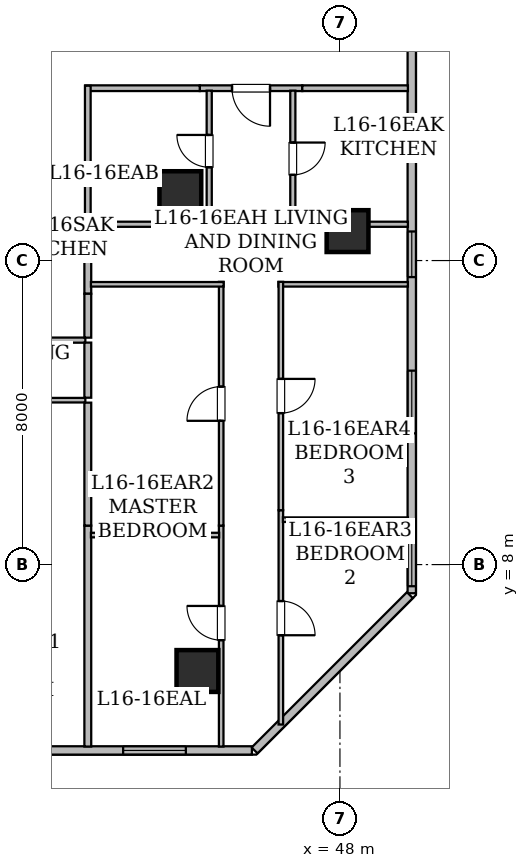
"""IFC4 building model, lengths in metres.
Left out: names, types, materials, properties, quantities, classifications, styles, units other than length and angle.
Written with IfcOpenShell. Run it as: python <this file> out.ifc"""

import sys

from ifc_helpers import new_model, si_unit, direction, frame, frame_2d, origin, origin_2d, place, context, subcontext, project, spatial, rectangle, hollow_rectangle, extrude, element, fill, save


model = new_model("IFC4")
c1 = context("Model", 3, precision=1e-05, world=origin(), true_north=direction((0.0, 1.0)))
c2 = subcontext(c1, "Body", "Model", "MODEL_VIEW")
j1 = project(units=[si_unit("LENGTHUNIT", "METRE"), si_unit("PLANEANGLEUNIT", "RADIAN")], contexts=[c1])
p1 = place(None, origin())
s1 = spatial("IfcSite", under=j1, at=p1, CompositionType="ELEMENT")
p2 = place(p1, origin())
s2 = spatial("IfcBuilding", under=s1, at=p2, CompositionType="ELEMENT")
p3 = place(p2, frame((0.0, 0.0, 66.15)))
s3 = spatial("IfcBuildingStorey", under=s2, at=p3, CompositionType="ELEMENT", Elevation=66.15)
for number, where, z_axis, x_axis in (
    (1, (44.25, 5.2, 0.0), (0.0, 0.0, 1.0), (1.0, 0.0, 0.0)),
    (2, (48.2, 16.775, 0.0), (0.0, 0.0, 1.0), (1.0, 0.0, 0.0)),
    (3, (43.8, 17.8, 0.0), (0.0, 0.0, 1.0), (1.0, 0.0, 0.0)),
):
    element("IfcColumn", number, at=place(p3, frame(where, z_axis=z_axis, x_axis=x_axis)), inside=s3, PredefinedType="COLUMN", context=c2, shape_type="SweptSolid", body=[
        extrude(hollow_rectangle(XDim=1.1, YDim=1.1, WallThickness=0.055, at=origin_2d()), origin(), (0.0, 0.0, 1.0), 3.65),
    ])
p4 = place(p3, frame((49.89, 24.707, 0.0), z_axis=(0.0, 0.0, 1.0), x_axis=(0.0, -1.0, 0.0)))
e4 = element("IfcWall", 4, at=p4, inside=s3, PredefinedType="STANDARD", context=c2, shape_type="SweptSolid", body=[
    extrude(rectangle(XDim=17.461, YDim=0.22, at=frame_2d((8.73, 0.0))), origin(), (0.0, 0.0, 1.0), 3.43),
])
p5 = place(p4, frame((7.942, 0.0, 0.8)))
e5 = element("IfcOpeningElement", 5, at=p5, cuts=e4, PredefinedType="OPENING", context=c2, shape_type="SweptSolid", body=[
    extrude(rectangle(XDim=1.2, YDim=1.5, at=frame_2d((0.6, 0.75))), frame((0.0, 0.12, 0.0), z_axis=(0.0, -1.0, 0.0), x_axis=(1.0, 0.0, 0.0)), (0.0, 0.0, 1.0), 0.24),
])
p6 = place(p4, frame((15.926, 0.0, 0.85)))
e6 = element("IfcOpeningElement", 6, at=p6, cuts=e4, PredefinedType="OPENING", context=c2, shape_type="SweptSolid", body=[
    extrude(rectangle(XDim=1.35, YDim=1.5, at=frame_2d((0.675, 0.75))), frame((0.0, 0.12, 0.0), z_axis=(0.0, -1.0, 0.0), x_axis=(1.0, 0.0, 0.0)), (0.0, 0.0, 1.0), 0.24),
])
p7 = place(p4, frame((11.604, 0.0, 0.85)))
e7 = element("IfcOpeningElement", 7, at=p7, cuts=e4, PredefinedType="OPENING", context=c2, shape_type="SweptSolid", body=[
    extrude(rectangle(XDim=1.65, YDim=1.55, at=frame_2d((0.825, 0.775))), frame((0.0, 0.12, 0.0), z_axis=(0.0, -1.0, 0.0), x_axis=(1.0, 0.0, 0.0)), (0.0, 0.0, 1.0), 0.24),
])
p8 = place(p4, frame((0.163, 0.0, 0.85)))
e8 = element("IfcOpeningElement", 8, at=p8, cuts=e4, PredefinedType="OPENING", context=c2, shape_type="SweptSolid", body=[
    extrude(rectangle(XDim=1.35, YDim=1.5, at=frame_2d((0.675, 0.75))), frame((0.0, 0.12, 0.0), z_axis=(0.0, -1.0, 0.0), x_axis=(1.0, 0.0, 0.0)), (0.0, 0.0, 1.0), 0.24),
])
p9 = place(p3, frame((49.84, 7.196, 0.0), z_axis=(0.0, 0.0, 1.0), x_axis=(-0.707127905562, -0.70708565618, 0.0)))
e9 = element("IfcWall", 9, at=p9, inside=s3, PredefinedType="STANDARD", context=c2, shape_type="SweptSolid", body=[
    extrude(rectangle(XDim=5.779, YDim=0.22, at=frame_2d((2.889, 0.0))), origin(), (0.0, 0.0, 1.0), 3.43),
])
p10 = place(p3, frame((45.683, 3.11, 0.0), z_axis=(0.0, 0.0, 1.0), x_axis=(-1.0, 0.0, 0.0)))
e10 = element("IfcWall", 10, at=p10, inside=s3, PredefinedType="STANDARD", context=c2, shape_type="SweptSolid", body=[
    extrude(rectangle(XDim=37.368, YDim=0.22, at=frame_2d((18.684, 0.0))), origin(), (0.0, 0.0, 1.0), 3.43),
])
p11 = place(p10, frame((13.808, 0.0, 0.85)))
e11 = element("IfcOpeningElement", 11, at=p11, cuts=e10, PredefinedType="OPENING", context=c2, shape_type="SweptSolid", body=[
    extrude(rectangle(XDim=1.65, YDim=1.55, at=frame_2d((0.825, 0.775))), frame((0.0, 0.12, 0.0), z_axis=(0.0, -1.0, 0.0), x_axis=(1.0, 0.0, 0.0)), (0.0, 0.0, 1.0), 0.24),
])
p12 = place(p10, frame((32.554, 0.0, 0.85)))
e12 = element("IfcOpeningElement", 12, at=p12, cuts=e10, PredefinedType="OPENING", context=c2, shape_type="SweptSolid", body=[
    extrude(rectangle(XDim=1.65, YDim=1.55, at=frame_2d((0.825, 0.775))), frame((0.0, 0.12, 0.0), z_axis=(0.0, -1.0, 0.0), x_axis=(1.0, 0.0, 0.0)), (0.0, 0.0, 1.0), 0.24),
])
p13 = place(p10, frame((19.438, 0.0, 0.85)))
e13 = element("IfcOpeningElement", 13, at=p13, cuts=e10, PredefinedType="OPENING", context=c2, shape_type="SweptSolid", body=[
    extrude(rectangle(XDim=1.65, YDim=1.55, at=frame_2d((0.825, 0.775))), frame((0.0, 0.12, 0.0), z_axis=(0.0, -1.0, 0.0), x_axis=(1.0, 0.0, 0.0)), (0.0, 0.0, 1.0), 0.24),
])
p14 = place(p10, frame((21.869, 0.0, 0.8)))
e14 = element("IfcOpeningElement", 14, at=p14, cuts=e10, PredefinedType="OPENING", context=c2, shape_type="SweptSolid", body=[
    extrude(rectangle(XDim=1.2, YDim=1.5, at=frame_2d((0.6, 0.75))), frame((0.0, 0.12, 0.0), z_axis=(0.0, -1.0, 0.0), x_axis=(1.0, 0.0, 0.0)), (0.0, 0.0, 1.0), 0.24),
])
p15 = place(p10, frame((28.512, 0.0, 0.85)))
e15 = element("IfcOpeningElement", 15, at=p15, cuts=e10, PredefinedType="OPENING", context=c2, shape_type="SweptSolid", body=[
    extrude(rectangle(XDim=1.65, YDim=1.55, at=frame_2d((0.825, 0.775))), frame((0.0, 0.12, 0.0), z_axis=(0.0, -1.0, 0.0), x_axis=(1.0, 0.0, 0.0)), (0.0, 0.0, 1.0), 0.24),
])
p16 = place(p10, frame((24.567, 0.0, 0.85)))
e16 = element("IfcOpeningElement", 16, at=p16, cuts=e10, PredefinedType="OPENING", context=c2, shape_type="SweptSolid", body=[
    extrude(rectangle(XDim=1.65, YDim=1.55, at=frame_2d((0.825, 0.775))), frame((0.0, 0.12, 0.0), z_axis=(0.0, -1.0, 0.0), x_axis=(1.0, 0.0, 0.0)), (0.0, 0.0, 1.0), 0.24),
])
p17 = place(p10, frame((9.028, 0.0, 0.8)))
e17 = element("IfcOpeningElement", 17, at=p17, cuts=e10, PredefinedType="OPENING", context=c2, shape_type="SweptSolid", body=[
    extrude(rectangle(XDim=1.2, YDim=1.5, at=frame_2d((0.6, 0.75))), frame((0.0, 0.12, 0.0), z_axis=(0.0, -1.0, 0.0), x_axis=(1.0, 0.0, 0.0)), (0.0, 0.0, 1.0), 0.24),
])
p18 = place(p10, frame((5.753, 0.0, 0.85)))
e18 = element("IfcOpeningElement", 18, at=p18, cuts=e10, PredefinedType="OPENING", context=c2, shape_type="SweptSolid", body=[
    extrude(rectangle(XDim=1.65, YDim=1.55, at=frame_2d((0.825, 0.775))), frame((0.0, 0.12, 0.0), z_axis=(0.0, -1.0, 0.0), x_axis=(1.0, 0.0, 0.0)), (0.0, 0.0, 1.0), 0.24),
])
p19 = place(p10, frame((1.738, 0.0, 0.85)))
e19 = element("IfcOpeningElement", 19, at=p19, cuts=e10, PredefinedType="OPENING", context=c2, shape_type="SweptSolid", body=[
    extrude(rectangle(XDim=1.65, YDim=1.55, at=frame_2d((0.825, 0.775))), frame((0.0, 0.12, 0.0), z_axis=(0.0, -1.0, 0.0), x_axis=(1.0, 0.0, 0.0)), (0.0, 0.0, 1.0), 0.24),
])
p20 = place(p3, frame((41.3, 16.835, 0.0), z_axis=(0.0, 0.0, 1.0), x_axis=(-1.0, 0.0, 0.0)))
e20 = element("IfcWall", 20, at=p20, inside=s3, PredefinedType="STANDARD", context=c2, shape_type="SweptSolid", body=[
    extrude(rectangle(XDim=1.636, YDim=0.15, at=frame_2d((0.818, 0.0))), origin(), (0.0, 0.0, 1.0), 3.43),
])
p21 = place(p3, frame((47.009, 20.535, 0.0), z_axis=(0.0, 0.0, 1.0), x_axis=(-1.0, 0.0, 0.0)))
e21 = element("IfcWall", 21, at=p21, inside=s3, PredefinedType="STANDARD", context=c2, shape_type="SweptSolid", body=[
    extrude(rectangle(XDim=2.698, YDim=0.15, at=frame_2d((1.349, 0.0))), origin(), (0.0, 0.0, 1.0), 3.43),
])
p22 = place(p21, frame((0.849, 0.0, 0.0)))
e22 = element("IfcOpeningElement", 22, at=p22, cuts=e21, PredefinedType="OPENING", context=c2, shape_type="SweptSolid", body=[
    extrude(rectangle(XDim=1.0, YDim=2.15, at=frame_2d((0.5, 1.075))), frame((0.0, 0.085, 0.0), z_axis=(0.0, -1.0, 0.0), x_axis=(1.0, 0.0, 0.0)), (0.0, 0.0, 1.0), 0.17),
])
p23 = place(p3, frame((41.365, 17.204, 0.0), z_axis=(0.0, 0.0, 1.0), x_axis=(0.0, -1.0, 0.0)))
e23 = element("IfcWall", 23, at=p23, inside=s3, PredefinedType="STANDARD", context=c2, shape_type="SweptSolid", body=[
    extrude(rectangle(XDim=0.304, YDim=0.15, at=frame_2d((0.152, 0.0))), origin(), (0.0, 0.0, 1.0), 3.43),
])
p24 = place(p3, frame((44.311, 20.535, 0.0), z_axis=(0.0, 0.0, 1.0), x_axis=(-1.0, 0.0, 0.0)))
e24 = element("IfcWall", 24, at=p24, inside=s3, PredefinedType="STANDARD", context=c2, shape_type="SweptSolid", body=[
    extrude(rectangle(XDim=3.011, YDim=0.15, at=frame_2d((1.505, 0.0))), origin(), (0.0, 0.0, 1.0), 2.647),
])
p25 = place(p3, frame((41.365, 20.6, 0.0), z_axis=(0.0, 0.0, 1.0), x_axis=(0.0, -1.0, 0.0)))
e25 = element("IfcWall", 25, at=p25, inside=s3, PredefinedType="STANDARD", context=c2, shape_type="SweptSolid", body=[
    extrude(rectangle(XDim=3.396, YDim=0.15, at=frame_2d((1.698, 0.0))), origin(), (0.0, 0.0, 1.0), 2.647),
])
p26 = place(p3, frame((49.788, 20.535, 0.0), z_axis=(0.0, 0.0, 1.0), x_axis=(-1.0, 0.0, 0.0)))
e26 = element("IfcWall", 26, at=p26, inside=s3, PredefinedType="STANDARD", context=c2, shape_type="SweptSolid", body=[
    extrude(rectangle(XDim=2.779, YDim=0.15, at=frame_2d((1.39, 0.0))), origin(), (0.0, 0.0, 1.0), 2.803),
])
p27 = place(p3, frame((39.35, 13.906, 0.0), z_axis=(0.0, 0.0, 1.0), x_axis=(1.0, 0.0, 0.0)))
e27 = element("IfcWall", 27, at=p27, inside=s3, PredefinedType="PARTITIONING", context=c2, shape_type="SweptSolid", body=[
    extrude(rectangle(XDim=1.95, YDim=0.135, at=frame_2d((0.975, 0.0))), origin(), (0.0, 0.0, 1.0), 3.43),
])
p28 = place(p3, frame((41.3, 12.326, 0.0), z_axis=(0.0, 0.0, 1.0), x_axis=(-1.0, 0.0, 0.0)))
e28 = element("IfcWall", 28, at=p28, inside=s3, PredefinedType="PARTITIONING", context=c2, shape_type="SweptSolid", body=[
    extrude(rectangle(XDim=4.52, YDim=0.12, at=frame_2d((2.26, 0.0))), origin(), (0.0, 0.0, 1.0), 3.43),
])
p29 = place(p3, frame((41.365, 13.841, 0.0), z_axis=(0.0, 0.0, 1.0), x_axis=(0.0, -1.0, 0.0)))
e29 = element("IfcWall", 29, at=p29, inside=s3, PredefinedType="STANDARD", context=c2, shape_type="SweptSolid", body=[
    extrude(rectangle(XDim=1.45, YDim=0.18, at=frame_2d((0.725, 0.0))), origin(), (0.0, 0.0, 1.0), 3.43),
])
p30 = place(p3, frame((41.365, 16.77, 0.0), z_axis=(0.0, 0.0, 1.0), x_axis=(0.0, -1.0, 0.0)))
e30 = element("IfcWall", 30, at=p30, inside=s3, PredefinedType="STANDARD", context=c2, shape_type="SweptSolid", body=[
    extrude(rectangle(XDim=1.644, YDim=0.18, at=frame_2d((0.822, 0.0))), origin(), (0.0, 0.0, 1.0), 3.43),
])
p31 = place(p3, frame((41.365, 15.126, 0.0), z_axis=(0.0, 0.0, 1.0), x_axis=(0.0, -1.0, 0.0)))
e31 = element("IfcWall", 31, at=p31, inside=s3, PredefinedType="STANDARD", context=c2, shape_type="SweptSolid", body=[
    extrude(rectangle(XDim=1.155, YDim=0.18, at=frame_2d((0.578, 0.0))), origin(), (0.0, 0.0, 1.0), 3.43),
])
p32 = place(p3, frame((41.365, 9.026, 0.0), z_axis=(0.0, 0.0, 1.0), x_axis=(0.0, -1.0, 0.0)))
e32 = element("IfcWall", 32, at=p32, inside=s3, PredefinedType="STANDARD", context=c2, shape_type="SweptSolid", body=[
    extrude(rectangle(XDim=5.814, YDim=0.18, at=frame_2d((2.907, 0.0))), origin(), (0.0, 0.0, 1.0), 2.803),
])
p33 = place(p3, frame((41.365, 12.261, 0.0), z_axis=(0.0, 0.0, 1.0), x_axis=(0.0, -1.0, 0.0)))
e33 = element("IfcWall", 33, at=p33, inside=s3, PredefinedType="STANDARD", context=c2, shape_type="SweptSolid", body=[
    extrude(rectangle(XDim=3.235, YDim=0.18, at=frame_2d((1.618, 0.0))), origin(), (0.0, 0.0, 1.0), 3.43),
])
p34 = place(p3, frame((41.432, 16.955, 0.0), z_axis=(0.0, 0.0, 1.0), x_axis=(1.0, 0.0, 0.0)))
e34 = element("IfcWall", 34, at=p34, inside=s3, PredefinedType="PARTITIONING", context=c2, shape_type="SweptSolid", body=[
    extrude(rectangle(XDim=3.193, YDim=0.135, at=frame_2d((1.597, 0.0))), origin(), (0.0, 0.0, 1.0), 2.647),
])
p35 = place(p3, frame((44.56, 16.89, 0.0), z_axis=(0.0, 0.0, 1.0), x_axis=(0.0, 1.0, 0.0)))
e35 = element("IfcWall", 35, at=p35, inside=s3, PredefinedType="PARTITIONING", context=c2, shape_type="SweptSolid", body=[
    extrude(rectangle(XDim=3.58, YDim=0.135, at=frame_2d((1.79, 0.0))), origin(), (0.0, 0.0, 1.0), 2.647),
])
p36 = place(p35, frame((1.565, 0.0, 0.0)))
e36 = element("IfcOpeningElement", 36, at=p36, cuts=e35, PredefinedType="OPENING", context=c2, shape_type="SweptSolid", body=[
    extrude(rectangle(XDim=0.85, YDim=2.1, at=frame_2d((0.425, 1.05))), frame((0.0, 0.077, 0.0), z_axis=(0.0, -1.0, 0.0), x_axis=(1.0, 0.0, 0.0)), (0.0, 0.0, 1.0), 0.155),
])
p37 = place(p3, frame((46.76, 20.47, 0.0), z_axis=(0.0, 0.0, 1.0), x_axis=(0.0, -1.0, 0.0)))
e37 = element("IfcWall", 37, at=p37, inside=s3, PredefinedType="PARTITIONING", context=c2, shape_type="SweptSolid", body=[
    extrude(rectangle(XDim=3.58, YDim=0.135, at=frame_2d((1.79, 0.0))), origin(), (0.0, 0.0, 1.0), 2.647),
])
p38 = place(p37, frame((1.365, 0.0, 0.0)))
e38 = element("IfcOpeningElement", 38, at=p38, cuts=e37, PredefinedType="OPENING", context=c2, shape_type="SweptSolid", body=[
    extrude(rectangle(XDim=0.85, YDim=2.1, at=frame_2d((0.425, 1.05))), frame((0.0, 0.077, 0.0), z_axis=(0.0, -1.0, 0.0), x_axis=(1.0, 0.0, 0.0)), (0.0, 0.0, 1.0), 0.155),
])
p39 = place(p3, frame((46.695, 16.955, 0.0), z_axis=(0.0, 0.0, 1.0), x_axis=(1.0, 0.0, 0.0)))
e39 = element("IfcWall", 39, at=p39, inside=s3, PredefinedType="PARTITIONING", context=c2, shape_type="SweptSolid", body=[
    extrude(rectangle(XDim=3.093, YDim=0.135, at=frame_2d((1.546, 0.0))), origin(), (0.0, 0.0, 1.0), 2.647),
])
p40 = place(p3, frame((44.875, 3.212, 0.0), z_axis=(0.0, 0.0, 1.0), x_axis=(0.0, 1.0, 0.0)))
e40 = element("IfcWall", 40, at=p40, inside=s3, PredefinedType="PARTITIONING", context=c2, shape_type="SweptSolid", body=[
    extrude(rectangle(XDim=5.814, YDim=0.12, at=frame_2d((2.907, 0.0))), origin(), (0.0, 0.0, 1.0), 2.803),
])
p41 = place(p40, frame((2.8, 0.0, 0.0)))
e41 = element("IfcOpeningElement", 41, at=p41, cuts=e40, PredefinedType="OPENING", context=c2, shape_type="SweptSolid", body=[
    extrude(rectangle(XDim=0.9, YDim=2.1, at=frame_2d((0.45, 1.05))), frame((0.0, 0.07, 0.0), z_axis=(0.0, -1.0, 0.0), x_axis=(1.0, 0.0, 0.0)), (0.0, 0.0, 1.0), 0.14),
])
p42 = place(p3, frame((44.875, 9.026, 0.0), z_axis=(0.0, 0.0, 1.0), x_axis=(0.0, 1.0, 0.0)))
e42 = element("IfcWall", 42, at=p42, inside=s3, PredefinedType="PARTITIONING", context=c2, shape_type="SweptSolid", body=[
    extrude(rectangle(XDim=6.414, YDim=0.12, at=frame_2d((3.207, 0.0))), origin(), (0.0, 0.0, 1.0), 3.43),
])
p43 = place(p42, frame((2.757, 0.0, 0.0)))
e43 = element("IfcOpeningElement", 43, at=p43, cuts=e42, PredefinedType="OPENING", context=c2, shape_type="SweptSolid", body=[
    extrude(rectangle(XDim=0.9, YDim=2.1, at=frame_2d((0.45, 1.05))), frame((0.0, 0.07, 0.0), z_axis=(0.0, -1.0, 0.0), x_axis=(1.0, 0.0, 0.0)), (0.0, 0.0, 1.0), 0.14),
])
p44 = place(p3, frame((44.94, 15.375, 0.0), z_axis=(0.0, 0.0, 1.0), x_axis=(-1.0, 0.0, 0.0)))
e44 = element("IfcWall", 44, at=p44, inside=s3, PredefinedType="PARTITIONING", context=c2, shape_type="SweptSolid", body=[
    extrude(rectangle(XDim=3.493, YDim=0.12, at=frame_2d((1.747, 0.0))), origin(), (0.0, 0.0, 1.0), 2.647),
])
p45 = place(p3, frame((46.445, 9.431, 0.0), z_axis=(0.0, 0.0, 1.0), x_axis=(0.0, -1.0, 0.0)))
e45 = element("IfcWall", 45, at=p45, inside=s3, PredefinedType="PARTITIONING", context=c2, shape_type="SweptSolid", body=[
    extrude(rectangle(XDim=5.639, YDim=0.12, at=frame_2d((2.819, 0.0))), origin(), (0.0, 0.0, 1.0), 3.43),
])
p46 = place(p45, frame((2.39, 0.0, 0.0)))
e46 = element("IfcOpeningElement", 46, at=p46, cuts=e45, PredefinedType="OPENING", context=c2, shape_type="SweptSolid", body=[
    extrude(rectangle(XDim=0.9, YDim=2.1, at=frame_2d((0.45, 1.05))), frame((0.0, 0.07, 0.0), z_axis=(0.0, -1.0, 0.0), x_axis=(1.0, 0.0, 0.0)), (0.0, 0.0, 1.0), 0.14),
])
p47 = place(p3, frame((49.788, 15.375, 0.0), z_axis=(0.0, 0.0, 1.0), x_axis=(-1.0, 0.0, 0.0)))
e47 = element("IfcWall", 47, at=p47, inside=s3, PredefinedType="PARTITIONING", context=c2, shape_type="SweptSolid", body=[
    extrude(rectangle(XDim=3.408, YDim=0.12, at=frame_2d((1.704, 0.0))), origin(), (0.0, 0.0, 1.0), 2.803),
])
p48 = place(p3, frame((46.445, 15.44, 0.0), z_axis=(0.0, 0.0, 1.0), x_axis=(0.0, -1.0, 0.0)))
e48 = element("IfcWall", 48, at=p48, inside=s3, PredefinedType="PARTITIONING", context=c2, shape_type="SweptSolid", body=[
    extrude(rectangle(XDim=6.009, YDim=0.12, at=frame_2d((3.004, 0.0))), origin(), (0.0, 0.0, 1.0), 2.803),
])
p49 = place(p48, frame((2.554, 0.0, 0.0)))
e49 = element("IfcOpeningElement", 49, at=p49, cuts=e48, PredefinedType="OPENING", context=c2, shape_type="SweptSolid", body=[
    extrude(rectangle(XDim=0.9, YDim=2.1, at=frame_2d((0.45, 1.05))), frame((0.0, 0.07, 0.0), z_axis=(0.0, -1.0, 0.0), x_axis=(1.0, 0.0, 0.0)), (0.0, 0.0, 1.0), 0.14),
])
p50 = place(p3, frame((41.447, 8.777, 0.0), z_axis=(0.0, 0.0, 1.0), x_axis=(1.0, 0.0, 0.0)))
e50 = element("IfcWall", 50, at=p50, inside=s3, PredefinedType="PARTITIONING", context=c2, shape_type="SweptSolid", body=[
    extrude(rectangle(XDim=3.374, YDim=0.12, at=frame_2d((1.687, 0.0))), origin(), (0.0, 0.0, 1.0), 2.647),
])
p51 = place(p3, frame((46.499, 9.182, 0.0), z_axis=(0.0, 0.0, 1.0), x_axis=(1.0, 0.0, 0.0)))
e51 = element("IfcWall", 51, at=p51, inside=s3, PredefinedType="PARTITIONING", context=c2, shape_type="SweptSolid", body=[
    extrude(rectangle(XDim=3.289, YDim=0.12, at=frame_2d((1.645, 0.0))), origin(), (0.0, 0.0, 1.0), 3.43),
])
p52 = place(p5, origin())
e52 = element("IfcWindow", 52, at=p52, inside=s3, PartitioningType="SINGLE_PANEL", PredefinedType="WINDOW", context=c2, shape_type="SweptSolid", body=[
    extrude(rectangle(XDim=1.2, YDim=1.5, at=frame_2d((0.6, 0.75))), frame((0.0, 0.03, 0.0), z_axis=(0.0, -1.0, 0.0), x_axis=(1.0, 0.0, 0.0)), (0.0, 0.0, 1.0), 0.06),
])
fill(e5, e52)
p53 = place(p19, origin())
e53 = element("IfcWindow", 53, at=p53, inside=s3, PartitioningType="SINGLE_PANEL", PredefinedType="WINDOW", context=c2, shape_type="SweptSolid", body=[
    extrude(rectangle(XDim=1.65, YDim=1.55, at=frame_2d((0.825, 0.775))), frame((0.0, 0.03, 0.0), z_axis=(0.0, -1.0, 0.0), x_axis=(1.0, 0.0, 0.0)), (0.0, 0.0, 1.0), 0.06),
])
fill(e19, e53)
p54 = place(p6, origin())
e54 = element("IfcWindow", 54, at=p54, inside=s3, PartitioningType="SINGLE_PANEL", PredefinedType="WINDOW", context=c2, shape_type="SweptSolid", body=[
    extrude(rectangle(XDim=1.35, YDim=1.5, at=frame_2d((0.675, 0.75))), frame((0.0, 0.03, 0.0), z_axis=(0.0, -1.0, 0.0), x_axis=(1.0, 0.0, 0.0)), (0.0, 0.0, 1.0), 0.06),
])
fill(e6, e54)
p55 = place(p7, origin())
e55 = element("IfcWindow", 55, at=p55, inside=s3, PartitioningType="SINGLE_PANEL", PredefinedType="WINDOW", context=c2, shape_type="SweptSolid", body=[
    extrude(rectangle(XDim=1.65, YDim=1.55, at=frame_2d((0.825, 0.775))), frame((0.0, 0.03, 0.0), z_axis=(0.0, -1.0, 0.0), x_axis=(1.0, 0.0, 0.0)), (0.0, 0.0, 1.0), 0.06),
])
fill(e7, e55)
p56 = place(p22, origin())
e56 = element("IfcDoor", 56, at=p56, inside=s3, OperationType="SINGLE_SWING_LEFT", PredefinedType="DOOR", context=c2, shape_type="SweptSolid", body=[
    extrude(rectangle(XDim=1.0, YDim=2.15, at=frame_2d((0.5, 1.075))), frame((0.0, 0.025, 0.0), z_axis=(0.0, -1.0, 0.0), x_axis=(1.0, 0.0, 0.0)), (0.0, 0.0, 1.0), 0.05),
])
fill(e22, e56)
p57 = place(p36, origin())
e57 = element("IfcDoor", 57, at=p57, inside=s3, OperationType="SINGLE_SWING_RIGHT", PredefinedType="DOOR", context=c2, shape_type="SweptSolid", body=[
    extrude(rectangle(XDim=0.85, YDim=2.1, at=frame_2d((0.425, 1.05))), frame((0.0, 0.025, 0.0), z_axis=(0.0, -1.0, 0.0), x_axis=(1.0, 0.0, 0.0)), (0.0, 0.0, 1.0), 0.05),
])
fill(e36, e57)
p58 = place(p38, origin())
e58 = element("IfcDoor", 58, at=p58, inside=s3, OperationType="SINGLE_SWING_LEFT", PredefinedType="DOOR", context=c2, shape_type="SweptSolid", body=[
    extrude(rectangle(XDim=0.85, YDim=2.1, at=frame_2d((0.425, 1.05))), frame((0.0, 0.025, 0.0), z_axis=(0.0, -1.0, 0.0), x_axis=(1.0, 0.0, 0.0)), (0.0, 0.0, 1.0), 0.05),
])
fill(e38, e58)
p59 = place(p41, origin())
e59 = element("IfcDoor", 59, at=p59, inside=s3, OperationType="SINGLE_SWING_RIGHT", PredefinedType="DOOR", context=c2, shape_type="SweptSolid", body=[
    extrude(rectangle(XDim=0.9, YDim=2.1, at=frame_2d((0.45, 1.05))), frame((0.0, 0.025, 0.0), z_axis=(0.0, -1.0, 0.0), x_axis=(1.0, 0.0, 0.0)), (0.0, 0.0, 1.0), 0.05),
])
fill(e41, e59)
p60 = place(p43, origin())
e60 = element("IfcDoor", 60, at=p60, inside=s3, OperationType="SINGLE_SWING_LEFT", PredefinedType="DOOR", context=c2, shape_type="SweptSolid", body=[
    extrude(rectangle(XDim=0.9, YDim=2.1, at=frame_2d((0.45, 1.05))), frame((0.0, 0.025, 0.0), z_axis=(0.0, -1.0, 0.0), x_axis=(1.0, 0.0, 0.0)), (0.0, 0.0, 1.0), 0.05),
])
fill(e43, e60)
p61 = place(p46, origin())
e61 = element("IfcDoor", 61, at=p61, inside=s3, OperationType="SINGLE_SWING_RIGHT", PredefinedType="DOOR", context=c2, shape_type="SweptSolid", body=[
    extrude(rectangle(XDim=0.9, YDim=2.1, at=frame_2d((0.45, 1.05))), frame((0.0, 0.025, 0.0), z_axis=(0.0, -1.0, 0.0), x_axis=(1.0, 0.0, 0.0)), (0.0, 0.0, 1.0), 0.05),
])
fill(e46, e61)
p62 = place(p49, origin())
e62 = element("IfcDoor", 62, at=p62, inside=s3, OperationType="SINGLE_SWING_LEFT", PredefinedType="DOOR", context=c2, shape_type="SweptSolid", body=[
    extrude(rectangle(XDim=0.9, YDim=2.1, at=frame_2d((0.45, 1.05))), frame((0.0, 0.025, 0.0), z_axis=(0.0, -1.0, 0.0), x_axis=(1.0, 0.0, 0.0)), (0.0, 0.0, 1.0), 0.05),
])
fill(e49, e62)
save(model, sys.argv[1])
